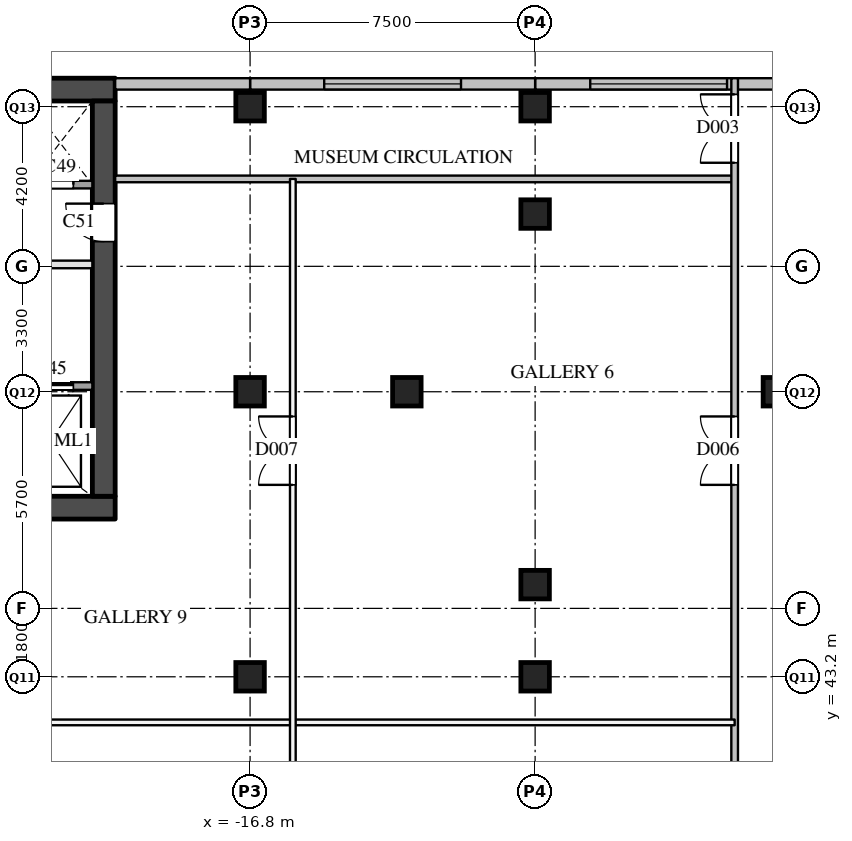
"""IFC4 building model, lengths in metres.
Left out: names, types, materials, properties, quantities, classifications, styles, units other than length and angle.
Written with IfcOpenShell. Run it as: python <this file> out.ifc"""

import sys

from ifc_helpers import new_model, si_unit, direction, frame, frame_2d, origin, origin_2d, place, context, subcontext, project, spatial, rectangle, extrude, element, fill, save


model = new_model("IFC4")
c1 = context("Model", 3, precision=1e-05, world=origin(), true_north=direction((0.0, 1.0)))
c2 = subcontext(c1, "Body", "Model", "MODEL_VIEW")
j1 = project(units=[si_unit("LENGTHUNIT", "METRE"), si_unit("PLANEANGLEUNIT", "RADIAN")], contexts=[c1])
p1 = place(None, origin())
s1 = spatial("IfcSite", under=j1, at=p1, CompositionType="ELEMENT")
p2 = place(p1, origin())
s2 = spatial("IfcBuilding", under=s1, at=p2, CompositionType="ELEMENT")
p3 = place(p2, frame((0.0, 0.0, 8.0)))
s3 = spatial("IfcBuildingStorey", under=s2, at=p3, CompositionType="ELEMENT", Elevation=8.0)
for number, where, z_axis, x_axis in (
    (1, (-16.8, 43.2, 0.0), (0.0, 0.0, 1.0), (1.0, 0.0, 0.0)),
    (2, (-16.8, 50.7, 0.0), (0.0, 0.0, 1.0), (1.0, 0.0, 0.0)),
    (3, (-16.8, 58.2, 0.0), (0.0, 0.0, 1.0), (1.0, 0.0, 0.0)),
    (4, (-9.3, 43.2, 0.0), (0.0, 0.0, 1.0), (1.0, 0.0, 0.0)),
    (5, (-9.3, 58.2, 0.0), (0.0, 0.0, 1.0), (1.0, 0.0, 0.0)),
    (6, (-12.675, 50.7, 0.0), (0.0, 0.0, 1.0), (1.0, 0.0, 0.0)),
    (7, (-9.3, 45.625, 0.0), (0.0, 0.0, 1.0), (1.0, 0.0, 0.0)),
    (8, (-9.3, 55.375, 0.0), (0.0, 0.0, 1.0), (1.0, 0.0, 0.0)),
    (9, (-2.925, 50.7, 0.0), (0.0, 0.0, 1.0), (1.0, 0.0, 0.0)),
):
    element("IfcColumn", number, at=place(p3, frame(where, z_axis=z_axis, x_axis=x_axis)), inside=s3, PredefinedType="COLUMN", context=c2, shape_type="SweptSolid", body=[
        extrude(rectangle(XDim=0.75, YDim=0.75, at=origin_2d()), origin(), (0.0, 0.0, 1.0), 6.0),
    ])
p4 = place(p3, frame((-1.8, 58.8, 0.0), z_axis=(0.0, 0.0, 1.0), x_axis=(-1.0, 0.0, 0.0)))
e10 = element("IfcWall", 10, at=p4, inside=s3, PredefinedType="SOLIDWALL", context=c2, shape_type="SweptSolid", body=[
    extrude(rectangle(XDim=7.5, YDim=0.3, at=frame_2d((3.75, 0.0))), origin(), (0.0, 0.0, 1.0), 5.59),
])
p5 = place(p4, frame((2.45, 0.0, 2.4)))
e11 = element("IfcOpeningElement", 11, at=p5, cuts=e10, PredefinedType="OPENING", context=c2, shape_type="SweptSolid", body=[
    extrude(rectangle(XDim=3.6, YDim=1.2, at=frame_2d((1.8, 0.6))), frame((0.0, 0.16, 0.0), z_axis=(0.0, -1.0, 0.0), x_axis=(1.0, 0.0, 0.0)), (0.0, 0.0, 1.0), 0.32),
])
p6 = place(p3, frame((-9.3, 58.8, 0.0), z_axis=(0.0, 0.0, 1.0), x_axis=(-1.0, 0.0, 0.0)))
e12 = element("IfcWall", 12, at=p6, inside=s3, PredefinedType="SOLIDWALL", context=c2, shape_type="SweptSolid", body=[
    extrude(rectangle(XDim=7.5, YDim=0.3, at=frame_2d((3.75, 0.0))), origin(), (0.0, 0.0, 1.0), 5.59),
])
p7 = place(p6, frame((1.95, 0.0, 2.4)))
e13 = element("IfcOpeningElement", 13, at=p7, cuts=e12, PredefinedType="OPENING", context=c2, shape_type="SweptSolid", body=[
    extrude(rectangle(XDim=3.6, YDim=1.2, at=frame_2d((1.8, 0.6))), frame((0.0, 0.16, 0.0), z_axis=(0.0, -1.0, 0.0), x_axis=(1.0, 0.0, 0.0)), (0.0, 0.0, 1.0), 0.32),
])
p8 = place(p3, frame((-16.8, 58.8, 0.0), z_axis=(0.0, 0.0, 1.0), x_axis=(-1.0, 0.0, 0.0)))
e14 = element("IfcWall", 14, at=p8, inside=s3, PredefinedType="SOLIDWALL", context=c2, shape_type="SweptSolid", body=[
    extrude(rectangle(XDim=3.55, YDim=0.3, at=frame_2d((1.775, 0.0))), origin(), (0.0, 0.0, 1.0), 5.59),
])
p9 = place(p3, frame((-32.55, 47.65, 0.0), z_axis=(0.0, 0.0, 1.0), x_axis=(1.0, 0.0, 0.0)))
e15 = element("IfcWall", 15, at=p9, inside=s3, PredefinedType="SHEAR", context=c2, shape_type="SweptSolid", body=[
    extrude(rectangle(XDim=12.2, YDim=0.6, at=frame_2d((6.1, 0.0))), origin(), (0.0, 0.0, 1.0), 5.59),
])
p10 = place(p9, frame((8.0, 0.0, 0.0)))
e16 = element("IfcOpeningElement", 16, at=p10, cuts=e15, PredefinedType="OPENING", context=c2, shape_type="SweptSolid", body=[
    extrude(rectangle(XDim=0.7, YDim=2.1, at=frame_2d((0.35, 1.05))), frame((0.0, 0.31, 0.0), z_axis=(0.0, -1.0, 0.0), x_axis=(1.0, 0.0, 0.0)), (0.0, 0.0, 1.0), 0.62),
])
p11 = place(p3, frame((-32.55, 58.65, 0.0), z_axis=(0.0, 0.0, 1.0), x_axis=(1.0, 0.0, 0.0)))
e17 = element("IfcWall", 17, at=p11, inside=s3, PredefinedType="SHEAR", context=c2, shape_type="SweptSolid", body=[
    extrude(rectangle(XDim=12.2, YDim=0.6, at=frame_2d((6.1, 0.0))), origin(), (0.0, 0.0, 1.0), 5.59),
])
p12 = place(p3, frame((-20.65, 47.95, 0.0), z_axis=(0.0, 0.0, 1.0), x_axis=(0.0, 1.0, 0.0)))
e18 = element("IfcWall", 18, at=p12, inside=s3, PredefinedType="SHEAR", context=c2, shape_type="SweptSolid", body=[
    extrude(rectangle(XDim=10.4, YDim=0.6, at=frame_2d((5.2, 0.0))), origin(), (0.0, 0.0, 1.0), 5.59),
])
p13 = place(p12, frame((6.7, 0.0, 0.0)))
e19 = element("IfcOpeningElement", 19, at=p13, cuts=e18, PredefinedType="OPENING", context=c2, shape_type="SweptSolid", body=[
    extrude(rectangle(XDim=1.0, YDim=2.1, at=frame_2d((0.5, 1.05))), frame((0.0, 0.31, 0.0), z_axis=(0.0, -1.0, 0.0), x_axis=(1.0, 0.0, 0.0)), (0.0, 0.0, 1.0), 0.62),
])
p14 = place(p3, frame((-25.25, 50.85, 0.0), z_axis=(0.0, 0.0, 1.0), x_axis=(1.0, 0.0, 0.0)))
e20 = element("IfcWall", 20, at=p14, inside=s3, PredefinedType="SOLIDWALL", context=c2, shape_type="SweptSolid", body=[
    extrude(rectangle(XDim=4.3, YDim=0.2, at=frame_2d((2.15, 0.0))), origin(), (0.0, 0.0, 1.0), 5.59),
])
p15 = place(p14, frame((2.6, 0.0, 0.0)))
e21 = element("IfcOpeningElement", 21, at=p15, cuts=e20, PredefinedType="OPENING", context=c2, shape_type="SweptSolid", body=[
    extrude(rectangle(XDim=1.2, YDim=2.1, at=frame_2d((0.6, 1.05))), frame((0.0, 0.11, 0.0), z_axis=(0.0, -1.0, 0.0), x_axis=(1.0, 0.0, 0.0)), (0.0, 0.0, 1.0), 0.22),
])
p16 = place(p3, frame((-25.25, 54.05, 0.0), z_axis=(0.0, 0.0, 1.0), x_axis=(1.0, 0.0, 0.0)))
e22 = element("IfcWall", 22, at=p16, inside=s3, PredefinedType="PARTITIONING", context=c2, shape_type="SweptSolid", body=[
    extrude(rectangle(XDim=4.3, YDim=0.2, at=frame_2d((2.15, 0.0))), origin(), (0.0, 0.0, 1.0), 5.59),
])
p17 = place(p16, frame((1.25, 0.0, 0.0)))
e23 = element("IfcOpeningElement", 23, at=p17, cuts=e22, PredefinedType="OPENING", context=c2, shape_type="SweptSolid", body=[
    extrude(rectangle(XDim=1.8, YDim=2.1, at=frame_2d((0.9, 1.05))), frame((0.0, 0.11, 0.0), z_axis=(0.0, -1.0, 0.0), x_axis=(1.0, 0.0, 0.0)), (0.0, 0.0, 1.0), 0.22),
])
p18 = place(p3, frame((-22.65, 56.15, 0.0), z_axis=(0.0, 0.0, 1.0), x_axis=(1.0, 0.0, 0.0)))
e24 = element("IfcWall", 24, at=p18, inside=s3, PredefinedType="SOLIDWALL", context=c2, shape_type="SweptSolid", body=[
    extrude(rectangle(XDim=1.7, YDim=0.2, at=frame_2d((0.85, 0.0))), origin(), (0.0, 0.0, 1.0), 5.59),
])
p19 = place(p18, frame((0.5, 0.0, 0.0)))
e25 = element("IfcOpeningElement", 25, at=p19, cuts=e24, PredefinedType="OPENING", context=c2, shape_type="SweptSolid", body=[
    extrude(rectangle(XDim=0.7, YDim=2.1, at=frame_2d((0.35, 1.05))), frame((0.0, 0.11, 0.0), z_axis=(0.0, -1.0, 0.0), x_axis=(1.0, 0.0, 0.0)), (0.0, 0.0, 1.0), 0.22),
])
p20 = place(p3, frame((-20.35, 56.3, 0.0), z_axis=(0.0, 0.0, 1.0), x_axis=(1.0, 0.0, 0.0)))
e26 = element("IfcWall", 26, at=p20, inside=s3, PredefinedType="PARTITIONING", context=c2, shape_type="SweptSolid", body=[
    extrude(rectangle(XDim=16.3, YDim=0.175, at=frame_2d((8.15, 0.0))), origin(), (0.0, 0.0, 1.0), 4.79),
])
p21 = place(p3, frame((-4.05, -4.05, 0.0), z_axis=(0.0, 0.0, 1.0), x_axis=(0.0, 1.0, 0.0)))
e27 = element("IfcWall", 27, at=p21, inside=s3, PredefinedType="PARTITIONING", context=c2, shape_type="SweptSolid", body=[
    extrude(rectangle(XDim=63.0, YDim=0.175, at=frame_2d((31.5, 0.0))), origin(), (0.0, 0.0, 1.0), 4.79),
])
p22 = place(p21, frame((7.125, 0.0, 0.0)))
e28 = element("IfcOpeningElement", 28, at=p22, cuts=e27, PredefinedType="OPENING", context=c2, shape_type="SweptSolid", body=[
    extrude(rectangle(XDim=1.8, YDim=2.1, at=frame_2d((0.9, 1.05))), frame((0.0, 0.097, 0.0), z_axis=(0.0, -1.0, 0.0), x_axis=(1.0, 0.0, 0.0)), (0.0, 0.0, 1.0), 0.195),
])
p23 = place(p21, frame((60.775, 0.0, 0.0)))
e29 = element("IfcOpeningElement", 29, at=p23, cuts=e27, PredefinedType="OPENING", context=c2, shape_type="SweptSolid", body=[
    extrude(rectangle(XDim=1.8, YDim=2.1, at=frame_2d((0.9, 1.05))), frame((0.0, 0.097, 0.0), z_axis=(0.0, -1.0, 0.0), x_axis=(1.0, 0.0, 0.0)), (0.0, 0.0, 1.0), 0.195),
])
p24 = place(p21, frame((22.65, 0.0, 0.0)))
e30 = element("IfcOpeningElement", 30, at=p24, cuts=e27, PredefinedType="OPENING", context=c2, shape_type="SweptSolid", body=[
    extrude(rectangle(XDim=1.8, YDim=2.1, at=frame_2d((0.9, 1.05))), frame((0.0, 0.097, 0.0), z_axis=(0.0, -1.0, 0.0), x_axis=(1.0, 0.0, 0.0)), (0.0, 0.0, 1.0), 0.195),
])
p25 = place(p21, frame((37.65, 0.0, 0.0)))
e31 = element("IfcOpeningElement", 31, at=p25, cuts=e27, PredefinedType="OPENING", context=c2, shape_type="SweptSolid", body=[
    extrude(rectangle(XDim=1.8, YDim=2.1, at=frame_2d((0.9, 1.05))), frame((0.0, 0.097, 0.0), z_axis=(0.0, -1.0, 0.0), x_axis=(1.0, 0.0, 0.0)), (0.0, 0.0, 1.0), 0.195),
])
p26 = place(p21, frame((52.3, 0.0, 0.0)))
e32 = element("IfcOpeningElement", 32, at=p26, cuts=e27, PredefinedType="OPENING", context=c2, shape_type="SweptSolid", body=[
    extrude(rectangle(XDim=1.8, YDim=2.1, at=frame_2d((0.9, 1.05))), frame((0.0, 0.097, 0.0), z_axis=(0.0, -1.0, 0.0), x_axis=(1.0, 0.0, 0.0)), (0.0, 0.0, 1.0), 0.195),
])
p27 = place(p3, frame((-27.3, 42.0, 0.0), z_axis=(0.0, 0.0, 1.0), x_axis=(1.0, 0.0, 0.0)))
e33 = element("IfcWall", 33, at=p27, inside=s3, PredefinedType="PARTITIONING", context=c2, shape_type="SweptSolid", body=[
    extrude(rectangle(XDim=23.25, YDim=0.15, at=frame_2d((11.625, 0.0))), origin(), (0.0, 0.0, 1.0), 4.79),
])
p28 = place(p3, frame((-15.675, 30.0, 0.0), z_axis=(0.0, 0.0, 1.0), x_axis=(0.0, 1.0, 0.0)))
e34 = element("IfcWall", 34, at=p28, inside=s3, PredefinedType="PARTITIONING", context=c2, shape_type="SweptSolid", body=[
    extrude(rectangle(XDim=26.3, YDim=0.15, at=frame_2d((13.15, 0.0))), origin(), (0.0, 0.0, 1.0), 4.79),
])
p29 = place(p28, frame((18.25, 0.0, 0.0)))
e35 = element("IfcOpeningElement", 35, at=p29, cuts=e34, PredefinedType="OPENING", context=c2, shape_type="SweptSolid", body=[
    extrude(rectangle(XDim=1.8, YDim=2.1, at=frame_2d((0.9, 1.05))), frame((0.0, 0.085, 0.0), z_axis=(0.0, -1.0, 0.0), x_axis=(1.0, 0.0, 0.0)), (0.0, 0.0, 1.0), 0.17),
])
p30 = place(p28, frame((7.04, 0.0, 0.0)))
e36 = element("IfcOpeningElement", 36, at=p30, cuts=e34, PredefinedType="OPENING", context=c2, shape_type="SweptSolid", body=[
    extrude(rectangle(XDim=1.8, YDim=2.1, at=frame_2d((0.9, 1.05))), frame((0.0, 0.085, 0.0), z_axis=(0.0, -1.0, 0.0), x_axis=(1.0, 0.0, 0.0)), (0.0, 0.0, 1.0), 0.17),
])
p31 = place(p5, origin())
e37 = element("IfcWindow", 37, at=p31, inside=s3, PartitioningType="SINGLE_PANEL", PredefinedType="WINDOW", context=c2, shape_type="SweptSolid", body=[
    extrude(rectangle(XDim=3.6, YDim=1.2, at=frame_2d((1.8, 0.6))), frame((0.0, 0.03, 0.0), z_axis=(0.0, -1.0, 0.0), x_axis=(1.0, 0.0, 0.0)), (0.0, 0.0, 1.0), 0.06),
])
fill(e11, e37)
p32 = place(p7, origin())
e38 = element("IfcWindow", 38, at=p32, inside=s3, PartitioningType="SINGLE_PANEL", PredefinedType="WINDOW", context=c2, shape_type="SweptSolid", body=[
    extrude(rectangle(XDim=3.6, YDim=1.2, at=frame_2d((1.8, 0.6))), frame((0.0, 0.03, 0.0), z_axis=(0.0, -1.0, 0.0), x_axis=(1.0, 0.0, 0.0)), (0.0, 0.0, 1.0), 0.06),
])
fill(e13, e38)
p33 = place(p15, origin())
e39 = element("IfcDoor", 39, at=p33, inside=s3, OperationType="SLIDING_TO_LEFT", PredefinedType="DOOR", context=c2, shape_type="SweptSolid", body=[
    extrude(rectangle(XDim=1.2, YDim=2.1, at=frame_2d((0.6, 1.05))), frame((0.0, 0.025, 0.0), z_axis=(0.0, -1.0, 0.0), x_axis=(1.0, 0.0, 0.0)), (0.0, 0.0, 1.0), 0.05),
])
fill(e21, e39)
p34 = place(p19, origin())
e40 = element("IfcDoor", 40, at=p34, inside=s3, OperationType="SINGLE_SWING_RIGHT", PredefinedType="DOOR", context=c2, shape_type="SweptSolid", body=[
    extrude(rectangle(XDim=0.7, YDim=2.1, at=frame_2d((0.35, 1.05))), frame((0.0, 0.025, 0.0), z_axis=(0.0, -1.0, 0.0), x_axis=(1.0, 0.0, 0.0)), (0.0, 0.0, 1.0), 0.05),
])
fill(e25, e40)
p35 = place(p13, origin())
e41 = element("IfcDoor", 41, at=p35, inside=s3, OperationType="SINGLE_SWING_RIGHT", PredefinedType="DOOR", context=c2, shape_type="SweptSolid", body=[
    extrude(rectangle(XDim=1.0, YDim=2.1, at=frame_2d((0.5, 1.05))), frame((0.0, 0.025, 0.0), z_axis=(0.0, -1.0, 0.0), x_axis=(1.0, 0.0, 0.0)), (0.0, 0.0, 1.0), 0.05),
])
fill(e19, e41)
p36 = place(p23, origin())
e42 = element("IfcDoor", 42, at=p36, inside=s3, OperationType="DOUBLE_DOOR_SINGLE_SWING", PredefinedType="DOOR", context=c2, shape_type="SweptSolid", body=[
    extrude(rectangle(XDim=1.8, YDim=2.1, at=frame_2d((0.9, 1.05))), frame((0.0, 0.025, 0.0), z_axis=(0.0, -1.0, 0.0), x_axis=(1.0, 0.0, 0.0)), (0.0, 0.0, 1.0), 0.05),
])
fill(e29, e42)
p37 = place(p26, origin())
e43 = element("IfcDoor", 43, at=p37, inside=s3, OperationType="DOUBLE_DOOR_SINGLE_SWING", PredefinedType="DOOR", context=c2, shape_type="SweptSolid", body=[
    extrude(rectangle(XDim=1.8, YDim=2.1, at=frame_2d((0.9, 1.05))), frame((0.0, 0.025, 0.0), z_axis=(0.0, -1.0, 0.0), x_axis=(1.0, 0.0, 0.0)), (0.0, 0.0, 1.0), 0.05),
])
fill(e32, e43)
p38 = place(p29, origin())
e44 = element("IfcDoor", 44, at=p38, inside=s3, OperationType="DOUBLE_DOOR_SINGLE_SWING", PredefinedType="DOOR", context=c2, shape_type="SweptSolid", body=[
    extrude(rectangle(XDim=1.8, YDim=2.1, at=frame_2d((0.9, 1.05))), frame((0.0, 0.025, 0.0), z_axis=(0.0, -1.0, 0.0), x_axis=(1.0, 0.0, 0.0)), (0.0, 0.0, 1.0), 0.05),
])
fill(e35, e44)
save(model, sys.argv[1])
